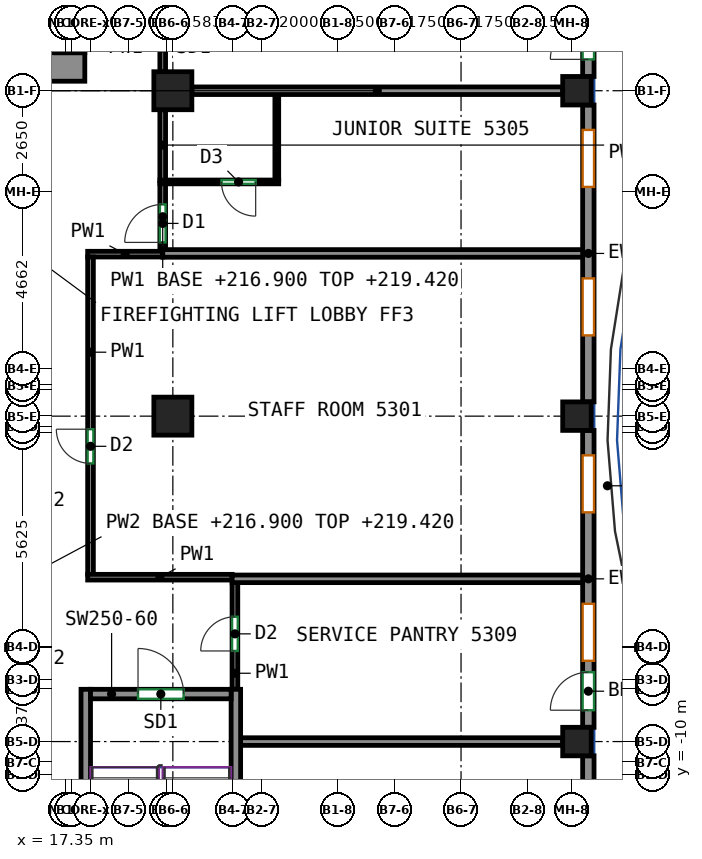
"""IFC4 building model, lengths in metres.
Left out: names, types, materials, properties, quantities, classifications, styles, units other than length and angle.
Written with IfcOpenShell. Run it as: python <this file> out.ifc"""

import sys

from ifc_helpers import new_model, si_unit, direction, frame, frame_2d, origin, origin_2d, place, context, subcontext, project, spatial, rectangle, extrude, source, transform, mapped, element, fill, save


model = new_model("IFC4")
c1 = context("Model", 3, precision=1e-05, world=origin(), true_north=direction((0.0, 1.0)))
c2 = subcontext(c1, "Body", "Model", "MODEL_VIEW")
j1 = project(units=[si_unit("LENGTHUNIT", "METRE"), si_unit("PLANEANGLEUNIT", "RADIAN")], contexts=[c1])
p1 = place(None, origin())
s1 = spatial("IfcSite", under=j1, at=p1, CompositionType="ELEMENT")
p2 = place(p1, origin())
s2 = spatial("IfcBuilding", under=s1, at=p2, CompositionType="ELEMENT")
p3 = place(p2, frame((0.0, 0.0, 216.9)))
s3 = spatial("IfcBuildingStorey", under=s2, at=p3, CompositionType="ELEMENT", Elevation=216.9)
m1 = source(origin(), c2, "Body", "SweptSolid", [
    extrude(rectangle(XDim=1.0, YDim=1.0, at=origin_2d()), origin(), (0.0, 0.0, 1.0), 3.12),
])
for number, where, z_axis, x_axis in (
    (1, (20.167, -0.562, 0.0), (0.0, 0.0, 1.0), (1.0, 0.0, 0.0)),
    (2, (20.167, 8.0, 0.0), (0.0, 0.0, 1.0), (1.0, 0.0, 0.0)),
):
    element("IfcColumn", number, at=place(p3, frame(where, z_axis=z_axis, x_axis=x_axis)), inside=s3, PredefinedType="COLUMN", context=c2, shape_type="MappedRepresentation", body=[
        mapped(m1, transform((0.0, 0.0, 0.0))),
    ])
m2 = source(origin(), c2, "Body", "SweptSolid", [
    extrude(rectangle(XDim=0.75, YDim=0.75, at=origin_2d()), origin(), (0.0, 0.0, 1.0), 3.12),
])
for number, where, z_axis, x_axis in (
    (3, (30.8, -9.125, 0.0), (0.0, 0.0, 1.0), (1.0, 0.0, 0.0)),
    (4, (30.8, -0.562, 0.0), (0.0, 0.0, 1.0), (1.0, 0.0, 0.0)),
    (5, (30.8, 8.0, 0.0), (0.0, 0.0, 1.0), (1.0, 0.0, 0.0)),
):
    element("IfcColumn", number, at=place(p3, frame(where, z_axis=z_axis, x_axis=x_axis)), inside=s3, PredefinedType="COLUMN", context=c2, shape_type="MappedRepresentation", body=[
        mapped(m2, transform((0.0, 0.0, 0.0))),
    ])
m3 = source(origin(), c2, "Body", "SweptSolid", [
    extrude(rectangle(XDim=5.38, YDim=0.75, at=frame_2d((2.69, 0.0))), origin(), (0.0, 0.0, 1.0), 3.12),
])
p4 = place(p3, frame((12.47, 8.625, 0.0), z_axis=(0.0, 0.0, 1.0), x_axis=(1.0, 0.0, 0.0)))
e6 = element("IfcWall", 6, at=p4, inside=s3, PredefinedType="SHEAR", context=c2, shape_type="MappedRepresentation", body=[
    mapped(m3, transform((0.0, 0.0, 0.0))),
])
p5 = place(p4, frame((2.18, 0.0, 0.0)))
e7 = element("IfcOpeningElement", 7, at=p5, cuts=e6, PredefinedType="OPENING", context=c2, shape_type="SweptSolid", body=[
    extrude(rectangle(XDim=1.2, YDim=2.1, at=frame_2d((0.6, 1.05))), frame((0.0, 0.385, 0.0), z_axis=(0.0, -1.0, 0.0), x_axis=(1.0, 0.0, 0.0)), (0.0, 0.0, 1.0), 0.77),
])
m4 = source(origin(), c2, "Body", "SweptSolid", [
    extrude(rectangle(XDim=8.0, YDim=0.25, at=frame_2d((4.0, 0.0))), origin(), (0.0, 0.0, 1.0), 3.12),
])
for number, where, z_axis, x_axis in (
    (8, (17.875, -15.75, 0.0), (0.0, 0.0, 1.0), (0.0, 1.0, 0.0)),
    (9, (21.825, -15.75, 0.0), (0.0, 0.0, 1.0), (0.0, 1.0, 0.0)),
):
    element("IfcWall", number, at=place(p3, frame(where, z_axis=z_axis, x_axis=x_axis)), inside=s3, PredefinedType="SHEAR", context=c2, shape_type="MappedRepresentation", body=[
        mapped(m4, transform((0.0, 0.0, 0.0))),
    ])
m5 = source(origin(), c2, "Body", "SweptSolid", [
    extrude(rectangle(XDim=3.7, YDim=0.25, at=frame_2d((1.85, 0.0))), origin(), (0.0, 0.0, 1.0), 3.12),
])
p6 = place(p3, frame((18.0, -7.875, 0.0), z_axis=(0.0, 0.0, 1.0), x_axis=(1.0, 0.0, 0.0)))
e10 = element("IfcWall", 10, at=p6, inside=s3, PredefinedType="SHEAR", context=c2, shape_type="MappedRepresentation", body=[
    mapped(m5, transform((0.0, 0.0, 0.0))),
])
p7 = place(p6, frame((1.25, 0.0, 0.0)))
e11 = element("IfcOpeningElement", 11, at=p7, cuts=e10, PredefinedType="OPENING", context=c2, shape_type="SweptSolid", body=[
    extrude(rectangle(XDim=1.2, YDim=2.1, at=frame_2d((0.6, 1.05))), frame((0.0, 0.135, 0.0), z_axis=(0.0, -1.0, 0.0), x_axis=(1.0, 0.0, 0.0)), (0.0, 0.0, 1.0), 0.27),
])
m6 = source(origin(), c2, "Body", "SweptSolid", [
    extrude(rectangle(XDim=7.812, YDim=0.3, at=frame_2d((3.906, 0.0))), origin(), (0.0, 0.0, 1.0), 3.12),
])
p8 = place(p3, frame((31.1, -17.312, 0.0), z_axis=(0.0, 0.0, 1.0), x_axis=(0.0, 1.0, 0.0)))
e12 = element("IfcWall", 12, at=p8, inside=s3, PredefinedType="SOLIDWALL", context=c2, shape_type="MappedRepresentation", body=[
    mapped(m6, transform((0.0, 0.0, 0.0))),
])
p9 = place(p8, frame((1.75, 0.0, 0.85)))
e13 = element("IfcOpeningElement", 13, at=p9, cuts=e12, PredefinedType="OPENING", context=c2, shape_type="SweptSolid", body=[
    extrude(rectangle(XDim=1.5, YDim=1.95, at=frame_2d((0.75, 0.975))), frame((0.0, 0.16, 0.0), z_axis=(0.0, -1.0, 0.0), x_axis=(1.0, 0.0, 0.0)), (0.0, 0.0, 1.0), 0.32),
])
p10 = place(p8, frame((0.45, 0.0, 0.0)))
e14 = element("IfcOpeningElement", 14, at=p10, cuts=e12, PredefinedType="OPENING", context=c2, shape_type="SweptSolid", body=[
    extrude(rectangle(XDim=1.0, YDim=2.1, at=frame_2d((0.5, 1.05))), frame((0.0, 0.16, 0.0), z_axis=(0.0, -1.0, 0.0), x_axis=(1.0, 0.0, 0.0)), (0.0, 0.0, 1.0), 0.32),
])
p11 = place(p8, frame((5.656, 0.0, 0.85)))
e15 = element("IfcOpeningElement", 15, at=p11, cuts=e12, PredefinedType="OPENING", context=c2, shape_type="SweptSolid", body=[
    extrude(rectangle(XDim=1.5, YDim=1.95, at=frame_2d((0.75, 0.975))), frame((0.0, 0.16, 0.0), z_axis=(0.0, -1.0, 0.0), x_axis=(1.0, 0.0, 0.0)), (0.0, 0.0, 1.0), 0.32),
])
p12 = place(p8, frame((4.356, 0.0, 0.0)))
e16 = element("IfcOpeningElement", 16, at=p12, cuts=e12, PredefinedType="OPENING", context=c2, shape_type="SweptSolid", body=[
    extrude(rectangle(XDim=1.0, YDim=2.1, at=frame_2d((0.5, 1.05))), frame((0.0, 0.16, 0.0), z_axis=(0.0, -1.0, 0.0), x_axis=(1.0, 0.0, 0.0)), (0.0, 0.0, 1.0), 0.32),
])
p13 = place(p3, frame((31.1, -8.75, 0.0), z_axis=(0.0, 0.0, 1.0), x_axis=(0.0, 1.0, 0.0)))
e17 = element("IfcWall", 17, at=p13, inside=s3, PredefinedType="SOLIDWALL", context=c2, shape_type="MappedRepresentation", body=[
    mapped(m6, transform((0.0, 0.0, 0.0))),
])
p14 = place(p13, frame((1.75, 0.0, 0.85)))
e18 = element("IfcOpeningElement", 18, at=p14, cuts=e17, PredefinedType="OPENING", context=c2, shape_type="SweptSolid", body=[
    extrude(rectangle(XDim=1.5, YDim=1.95, at=frame_2d((0.75, 0.975))), frame((0.0, 0.16, 0.0), z_axis=(0.0, -1.0, 0.0), x_axis=(1.0, 0.0, 0.0)), (0.0, 0.0, 1.0), 0.32),
])
p15 = place(p13, frame((0.45, 0.0, 0.0)))
e19 = element("IfcOpeningElement", 19, at=p15, cuts=e17, PredefinedType="OPENING", context=c2, shape_type="SweptSolid", body=[
    extrude(rectangle(XDim=1.0, YDim=2.1, at=frame_2d((0.5, 1.05))), frame((0.0, 0.16, 0.0), z_axis=(0.0, -1.0, 0.0), x_axis=(1.0, 0.0, 0.0)), (0.0, 0.0, 1.0), 0.32),
])
p16 = place(p13, frame((5.656, 0.0, 0.85)))
e20 = element("IfcOpeningElement", 20, at=p16, cuts=e17, PredefinedType="OPENING", context=c2, shape_type="SweptSolid", body=[
    extrude(rectangle(XDim=1.5, YDim=1.95, at=frame_2d((0.75, 0.975))), frame((0.0, 0.16, 0.0), z_axis=(0.0, -1.0, 0.0), x_axis=(1.0, 0.0, 0.0)), (0.0, 0.0, 1.0), 0.32),
])
p17 = place(p3, frame((31.1, -0.188, 0.0), z_axis=(0.0, 0.0, 1.0), x_axis=(0.0, 1.0, 0.0)))
e21 = element("IfcWall", 21, at=p17, inside=s3, PredefinedType="SOLIDWALL", context=c2, shape_type="MappedRepresentation", body=[
    mapped(m6, transform((0.0, 0.0, 0.0))),
])
p18 = place(p17, frame((1.75, 0.0, 0.85)))
e22 = element("IfcOpeningElement", 22, at=p18, cuts=e21, PredefinedType="OPENING", context=c2, shape_type="SweptSolid", body=[
    extrude(rectangle(XDim=1.5, YDim=1.95, at=frame_2d((0.75, 0.975))), frame((0.0, 0.16, 0.0), z_axis=(0.0, -1.0, 0.0), x_axis=(1.0, 0.0, 0.0)), (0.0, 0.0, 1.0), 0.32),
])
p19 = place(p17, frame((5.656, 0.0, 0.85)))
e23 = element("IfcOpeningElement", 23, at=p19, cuts=e21, PredefinedType="OPENING", context=c2, shape_type="SweptSolid", body=[
    extrude(rectangle(XDim=1.5, YDim=1.95, at=frame_2d((0.75, 0.975))), frame((0.0, 0.16, 0.0), z_axis=(0.0, -1.0, 0.0), x_axis=(1.0, 0.0, 0.0)), (0.0, 0.0, 1.0), 0.32),
])
m7 = source(origin(), c2, "Body", "SweptSolid", [
    extrude(rectangle(XDim=14.0, YDim=0.3, at=frame_2d((7.0, 0.0))), origin(), (0.0, 0.0, 1.0), 3.12),
])
p20 = place(p3, frame((31.1, 8.375, 0.0), z_axis=(0.0, 0.0, 1.0), x_axis=(0.0, 1.0, 0.0)))
e24 = element("IfcWall", 24, at=p20, inside=s3, PredefinedType="SOLIDWALL", context=c2, shape_type="MappedRepresentation", body=[
    mapped(m7, transform((0.0, 0.0, 0.0))),
])
p21 = place(p20, frame((1.75, 0.0, 0.85)))
e25 = element("IfcOpeningElement", 25, at=p21, cuts=e24, PredefinedType="OPENING", context=c2, shape_type="SweptSolid", body=[
    extrude(rectangle(XDim=1.5, YDim=1.95, at=frame_2d((0.75, 0.975))), frame((0.0, 0.16, 0.0), z_axis=(0.0, -1.0, 0.0), x_axis=(1.0, 0.0, 0.0)), (0.0, 0.0, 1.0), 0.32),
])
p22 = place(p20, frame((0.45, 0.0, 0.0)))
e26 = element("IfcOpeningElement", 26, at=p22, cuts=e24, PredefinedType="OPENING", context=c2, shape_type="SweptSolid", body=[
    extrude(rectangle(XDim=1.0, YDim=2.1, at=frame_2d((0.5, 1.05))), frame((0.0, 0.16, 0.0), z_axis=(0.0, -1.0, 0.0), x_axis=(1.0, 0.0, 0.0)), (0.0, 0.0, 1.0), 0.32),
])
p23 = place(p20, frame((5.25, 0.0, 0.85)))
e27 = element("IfcOpeningElement", 27, at=p23, cuts=e24, PredefinedType="OPENING", context=c2, shape_type="SweptSolid", body=[
    extrude(rectangle(XDim=1.5, YDim=1.95, at=frame_2d((0.75, 0.975))), frame((0.0, 0.16, 0.0), z_axis=(0.0, -1.0, 0.0), x_axis=(1.0, 0.0, 0.0)), (0.0, 0.0, 1.0), 0.32),
])
p24 = place(p20, frame((3.95, 0.0, 0.0)))
e28 = element("IfcOpeningElement", 28, at=p24, cuts=e24, PredefinedType="OPENING", context=c2, shape_type="SweptSolid", body=[
    extrude(rectangle(XDim=1.0, YDim=2.1, at=frame_2d((0.5, 1.05))), frame((0.0, 0.16, 0.0), z_axis=(0.0, -1.0, 0.0), x_axis=(1.0, 0.0, 0.0)), (0.0, 0.0, 1.0), 0.32),
])
p25 = place(p20, frame((8.75, 0.0, 0.85)))
e29 = element("IfcOpeningElement", 29, at=p25, cuts=e24, PredefinedType="OPENING", context=c2, shape_type="SweptSolid", body=[
    extrude(rectangle(XDim=1.5, YDim=1.95, at=frame_2d((0.75, 0.975))), frame((0.0, 0.16, 0.0), z_axis=(0.0, -1.0, 0.0), x_axis=(1.0, 0.0, 0.0)), (0.0, 0.0, 1.0), 0.32),
])
p26 = place(p20, frame((7.45, 0.0, 0.0)))
e30 = element("IfcOpeningElement", 30, at=p26, cuts=e24, PredefinedType="OPENING", context=c2, shape_type="SweptSolid", body=[
    extrude(rectangle(XDim=1.0, YDim=2.1, at=frame_2d((0.5, 1.05))), frame((0.0, 0.16, 0.0), z_axis=(0.0, -1.0, 0.0), x_axis=(1.0, 0.0, 0.0)), (0.0, 0.0, 1.0), 0.32),
])
p27 = place(p20, frame((12.25, 0.0, 0.85)))
e31 = element("IfcOpeningElement", 31, at=p27, cuts=e24, PredefinedType="OPENING", context=c2, shape_type="SweptSolid", body=[
    extrude(rectangle(XDim=1.5, YDim=1.95, at=frame_2d((0.75, 0.975))), frame((0.0, 0.16, 0.0), z_axis=(0.0, -1.0, 0.0), x_axis=(1.0, 0.0, 0.0)), (0.0, 0.0, 1.0), 0.32),
])
p28 = place(p20, frame((10.95, 0.0, 0.0)))
e32 = element("IfcOpeningElement", 32, at=p28, cuts=e24, PredefinedType="OPENING", context=c2, shape_type="SweptSolid", body=[
    extrude(rectangle(XDim=1.0, YDim=2.1, at=frame_2d((0.5, 1.05))), frame((0.0, 0.16, 0.0), z_axis=(0.0, -1.0, 0.0), x_axis=(1.0, 0.0, 0.0)), (0.0, 0.0, 1.0), 0.32),
])
p29 = place(p3, frame((19.9, 3.809, 0.0), z_axis=(0.0, 0.0, 1.0), x_axis=(0.0, 1.0, 0.0)))
e33 = element("IfcWall", 33, at=p29, inside=s3, PredefinedType="PARTITIONING", context=c2, shape_type="SweptSolid", body=[
    extrude(rectangle(XDim=1.751, YDim=0.15, at=frame_2d((0.875, 0.0))), origin(), (0.0, 0.0, 1.0), 2.52),
])
p30 = place(p29, frame((0.2, 0.0, 0.0)))
e34 = element("IfcOpeningElement", 34, at=p30, cuts=e33, PredefinedType="OPENING", context=c2, shape_type="SweptSolid", body=[
    extrude(rectangle(XDim=1.0, YDim=2.1, at=frame_2d((0.5, 1.05))), frame((0.0, 0.085, 0.0), z_axis=(0.0, -1.0, 0.0), x_axis=(1.0, 0.0, 0.0)), (0.0, 0.0, 1.0), 0.17),
])
p31 = place(p3, frame((19.9, 5.64, 0.0), z_axis=(0.0, 0.0, 1.0), x_axis=(0.0, 1.0, 0.0)))
e35 = element("IfcWall", 35, at=p31, inside=s3, PredefinedType="PARTITIONING", context=c2, shape_type="SweptSolid", body=[
    extrude(rectangle(XDim=1.86, YDim=0.15, at=frame_2d((0.93, 0.0))), origin(), (0.0, 0.0, 1.0), 2.52),
])
p32 = place(p3, frame((19.9, 8.5, 0.0), z_axis=(0.0, 0.0, 1.0), x_axis=(0.0, 1.0, 0.0)))
e36 = element("IfcWall", 36, at=p32, inside=s3, PredefinedType="PARTITIONING", context=c2, shape_type="SweptSolid", body=[
    extrude(rectangle(XDim=1.25, YDim=0.15, at=frame_2d((0.625, 0.0))), origin(), (0.0, 0.0, 1.0), 3.12),
])
p33 = place(p3, frame((17.925, 3.7, 0.0), z_axis=(0.0, 0.0, 1.0), x_axis=(1.0, 0.0, 0.0)))
e37 = element("IfcWall", 37, at=p33, inside=s3, PredefinedType="PARTITIONING", context=c2, shape_type="SweptSolid", body=[
    extrude(rectangle(XDim=1.975, YDim=0.15, at=frame_2d((0.987, 0.0))), origin(), (0.0, 0.0, 1.0), 3.12),
])
p34 = place(p3, frame((18.0, -4.725, 0.0), z_axis=(0.0, 0.0, 1.0), x_axis=(0.0, 1.0, 0.0)))
e38 = element("IfcWall", 38, at=p34, inside=s3, PredefinedType="PARTITIONING", context=c2, shape_type="SweptSolid", body=[
    extrude(rectangle(XDim=8.35, YDim=0.15, at=frame_2d((4.175, 0.0))), origin(), (0.0, 0.0, 1.0), 3.12),
])
p35 = place(p34, frame((2.919, 0.0, 0.0)))
e39 = element("IfcOpeningElement", 39, at=p35, cuts=e38, PredefinedType="OPENING", context=c2, shape_type="SweptSolid", body=[
    extrude(rectangle(XDim=0.9, YDim=2.1, at=frame_2d((0.45, 1.05))), frame((0.0, 0.085, 0.0), z_axis=(0.0, -1.0, 0.0), x_axis=(1.0, 0.0, 0.0)), (0.0, 0.0, 1.0), 0.17),
])
p36 = place(p3, frame((17.925, -4.8, 0.0), z_axis=(0.0, 0.0, 1.0), x_axis=(1.0, 0.0, 0.0)))
e40 = element("IfcWall", 40, at=p36, inside=s3, PredefinedType="PARTITIONING", context=c2, shape_type="SweptSolid", body=[
    extrude(rectangle(XDim=3.802, YDim=0.15, at=frame_2d((1.901, 0.0))), origin(), (0.0, 0.0, 1.0), 3.12),
])
p37 = place(p3, frame((21.8, -7.75, 0.0), z_axis=(0.0, 0.0, 1.0), x_axis=(0.0, 1.0, 0.0)))
e41 = element("IfcWall", 41, at=p37, inside=s3, PredefinedType="PARTITIONING", context=c2, shape_type="SweptSolid", body=[
    extrude(rectangle(XDim=2.817, YDim=0.15, at=frame_2d((1.408, 0.0))), origin(), (0.0, 0.0, 1.0), 3.12),
])
p38 = place(p37, frame((1.009, 0.0, 0.0)))
e42 = element("IfcOpeningElement", 42, at=p38, cuts=e41, PredefinedType="OPENING", context=c2, shape_type="SweptSolid", body=[
    extrude(rectangle(XDim=0.9, YDim=2.1, at=frame_2d((0.45, 1.05))), frame((0.0, 0.085, 0.0), z_axis=(0.0, -1.0, 0.0), x_axis=(1.0, 0.0, 0.0)), (0.0, 0.0, 1.0), 0.17),
])
p39 = place(p3, frame((22.952, 5.6, 0.0), z_axis=(0.0, 0.0, 1.0), x_axis=(-1.0, 0.0, 0.0)))
e43 = element("IfcWall", 43, at=p39, inside=s3, PredefinedType="PARTITIONING", context=c2, shape_type="SweptSolid", body=[
    extrude(rectangle(XDim=3.125, YDim=0.1, at=frame_2d((1.562, 0.0))), origin(), (0.0, 0.0, 1.0), 3.12),
])
p40 = place(p39, frame((0.606, 0.0, 0.0)))
e44 = element("IfcOpeningElement", 44, at=p40, cuts=e43, PredefinedType="OPENING", context=c2, shape_type="SweptSolid", body=[
    extrude(rectangle(XDim=0.9, YDim=2.1, at=frame_2d((0.45, 1.05))), frame((0.0, 0.06, 0.0), z_axis=(0.0, -1.0, 0.0), x_axis=(1.0, 0.0, 0.0)), (0.0, 0.0, 1.0), 0.12),
])
p41 = place(p3, frame((22.902, 5.65, 0.0), z_axis=(0.0, 0.0, 1.0), x_axis=(0.0, 1.0, 0.0)))
e45 = element("IfcWall", 45, at=p41, inside=s3, PredefinedType="PARTITIONING", context=c2, shape_type="SweptSolid", body=[
    extrude(rectangle(XDim=2.25, YDim=0.1, at=frame_2d((1.125, 0.0))), origin(), (0.0, 0.0, 1.0), 3.12),
])
p42 = place(p3, frame((19.902, 3.719, 0.0), z_axis=(0.0, 0.0, 1.0), x_axis=(1.0, 0.0, 0.0)))
e46 = element("IfcWall", 46, at=p42, inside=s3, PredefinedType="PARTITIONING", context=c2, shape_type="SweptSolid", body=[
    extrude(rectangle(XDim=11.098, YDim=0.2, at=frame_2d((5.549, 0.0))), origin(), (0.0, 0.0, 1.0), 3.12),
])
p43 = place(p3, frame((20.667, 8.0, 0.0), z_axis=(0.0, 0.0, 1.0), x_axis=(1.0, 0.0, 0.0)))
e47 = element("IfcWall", 47, at=p43, inside=s3, PredefinedType="PARTITIONING", context=c2, shape_type="SweptSolid", body=[
    extrude(rectangle(XDim=9.758, YDim=0.2, at=frame_2d((4.879, 0.0))), origin(), (0.0, 0.0, 1.0), 2.52),
])
p44 = place(p3, frame((21.727, -4.843, 0.0), z_axis=(0.0, 0.0, 1.0), x_axis=(1.0, 0.0, 0.0)))
e48 = element("IfcWall", 48, at=p44, inside=s3, PredefinedType="PARTITIONING", context=c2, shape_type="SweptSolid", body=[
    extrude(rectangle(XDim=9.273, YDim=0.2, at=frame_2d((4.636, 0.0))), origin(), (0.0, 0.0, 1.0), 3.12),
])
p45 = place(p3, frame((21.95, -9.125, 0.0), z_axis=(0.0, 0.0, 1.0), x_axis=(1.0, 0.0, 0.0)))
e49 = element("IfcWall", 49, at=p45, inside=s3, PredefinedType="PARTITIONING", context=c2, shape_type="SweptSolid", body=[
    extrude(rectangle(XDim=8.475, YDim=0.2, at=frame_2d((4.238, 0.0))), origin(), (0.0, 0.0, 1.0), 3.12),
])
p46 = place(p14, origin())
e50 = element("IfcWindow", 50, at=p46, inside=s3, PartitioningType="SINGLE_PANEL", PredefinedType="WINDOW", context=c2, shape_type="SweptSolid", body=[
    extrude(rectangle(XDim=1.5, YDim=1.95, at=frame_2d((0.75, 0.975))), frame((0.0, 0.03, 0.0), z_axis=(0.0, -1.0, 0.0), x_axis=(1.0, 0.0, 0.0)), (0.0, 0.0, 1.0), 0.06),
])
fill(e18, e50)
p47 = place(p15, origin())
e51 = element("IfcDoor", 51, at=p47, inside=s3, OperationType="SINGLE_SWING_LEFT", PredefinedType="DOOR", context=c2, shape_type="SweptSolid", body=[
    extrude(rectangle(XDim=1.0, YDim=2.1, at=frame_2d((0.5, 1.05))), frame((0.0, 0.025, 0.0), z_axis=(0.0, -1.0, 0.0), x_axis=(1.0, 0.0, 0.0)), (0.0, 0.0, 1.0), 0.05),
])
fill(e19, e51)
p48 = place(p16, origin())
e52 = element("IfcWindow", 52, at=p48, inside=s3, PartitioningType="SINGLE_PANEL", PredefinedType="WINDOW", context=c2, shape_type="SweptSolid", body=[
    extrude(rectangle(XDim=1.5, YDim=1.95, at=frame_2d((0.75, 0.975))), frame((0.0, 0.03, 0.0), z_axis=(0.0, -1.0, 0.0), x_axis=(1.0, 0.0, 0.0)), (0.0, 0.0, 1.0), 0.06),
])
fill(e20, e52)
p49 = place(p18, origin())
e53 = element("IfcWindow", 53, at=p49, inside=s3, PartitioningType="SINGLE_PANEL", PredefinedType="WINDOW", context=c2, shape_type="SweptSolid", body=[
    extrude(rectangle(XDim=1.5, YDim=1.95, at=frame_2d((0.75, 0.975))), frame((0.0, 0.03, 0.0), z_axis=(0.0, -1.0, 0.0), x_axis=(1.0, 0.0, 0.0)), (0.0, 0.0, 1.0), 0.06),
])
fill(e22, e53)
p50 = place(p19, origin())
e54 = element("IfcWindow", 54, at=p50, inside=s3, PartitioningType="SINGLE_PANEL", PredefinedType="WINDOW", context=c2, shape_type="SweptSolid", body=[
    extrude(rectangle(XDim=1.5, YDim=1.95, at=frame_2d((0.75, 0.975))), frame((0.0, 0.03, 0.0), z_axis=(0.0, -1.0, 0.0), x_axis=(1.0, 0.0, 0.0)), (0.0, 0.0, 1.0), 0.06),
])
fill(e23, e54)
p51 = place(p22, origin())
e55 = element("IfcDoor", 55, at=p51, inside=s3, OperationType="SINGLE_SWING_LEFT", PredefinedType="DOOR", context=c2, shape_type="SweptSolid", body=[
    extrude(rectangle(XDim=1.0, YDim=2.1, at=frame_2d((0.5, 1.05))), frame((0.0, 0.025, 0.0), z_axis=(0.0, -1.0, 0.0), x_axis=(1.0, 0.0, 0.0)), (0.0, 0.0, 1.0), 0.05),
])
fill(e26, e55)
p52 = place(p7, origin())
e56 = element("IfcDoor", 56, at=p52, inside=s3, OperationType="DOUBLE_DOOR_SINGLE_SWING", PredefinedType="DOOR", context=c2, shape_type="SweptSolid", body=[
    extrude(rectangle(XDim=1.2, YDim=2.1, at=frame_2d((0.6, 1.05))), frame((0.0, 0.025, 0.0), z_axis=(0.0, -1.0, 0.0), x_axis=(1.0, 0.0, 0.0)), (0.0, 0.0, 1.0), 0.05),
])
fill(e11, e56)
p53 = place(p38, origin())
e57 = element("IfcDoor", 57, at=p53, inside=s3, OperationType="SINGLE_SWING_LEFT", PredefinedType="DOOR", context=c2, shape_type="SweptSolid", body=[
    extrude(rectangle(XDim=0.9, YDim=2.1, at=frame_2d((0.45, 1.05))), frame((0.0, 0.025, 0.0), z_axis=(0.0, -1.0, 0.0), x_axis=(1.0, 0.0, 0.0)), (0.0, 0.0, 1.0), 0.05),
])
fill(e42, e57)
p54 = place(p35, origin())
e58 = element("IfcDoor", 58, at=p54, inside=s3, OperationType="SINGLE_SWING_RIGHT", PredefinedType="DOOR", context=c2, shape_type="SweptSolid", body=[
    extrude(rectangle(XDim=0.9, YDim=2.1, at=frame_2d((0.45, 1.05))), frame((0.0, 0.025, 0.0), z_axis=(0.0, -1.0, 0.0), x_axis=(1.0, 0.0, 0.0)), (0.0, 0.0, 1.0), 0.05),
])
fill(e39, e58)
p55 = place(p30, origin())
e59 = element("IfcDoor", 59, at=p55, inside=s3, OperationType="SINGLE_SWING_LEFT", PredefinedType="DOOR", context=c2, shape_type="SweptSolid", body=[
    extrude(rectangle(XDim=1.0, YDim=2.1, at=frame_2d((0.5, 1.05))), frame((0.0, 0.025, 0.0), z_axis=(0.0, -1.0, 0.0), x_axis=(1.0, 0.0, 0.0)), (0.0, 0.0, 1.0), 0.05),
])
fill(e34, e59)
p56 = place(p40, origin())
e60 = element("IfcDoor", 60, at=p56, inside=s3, OperationType="SINGLE_SWING_LEFT", PredefinedType="DOOR", context=c2, shape_type="SweptSolid", body=[
    extrude(rectangle(XDim=0.9, YDim=2.1, at=frame_2d((0.45, 1.05))), frame((0.0, 0.025, 0.0), z_axis=(0.0, -1.0, 0.0), x_axis=(1.0, 0.0, 0.0)), (0.0, 0.0, 1.0), 0.05),
])
fill(e44, e60)
save(model, sys.argv[1])
